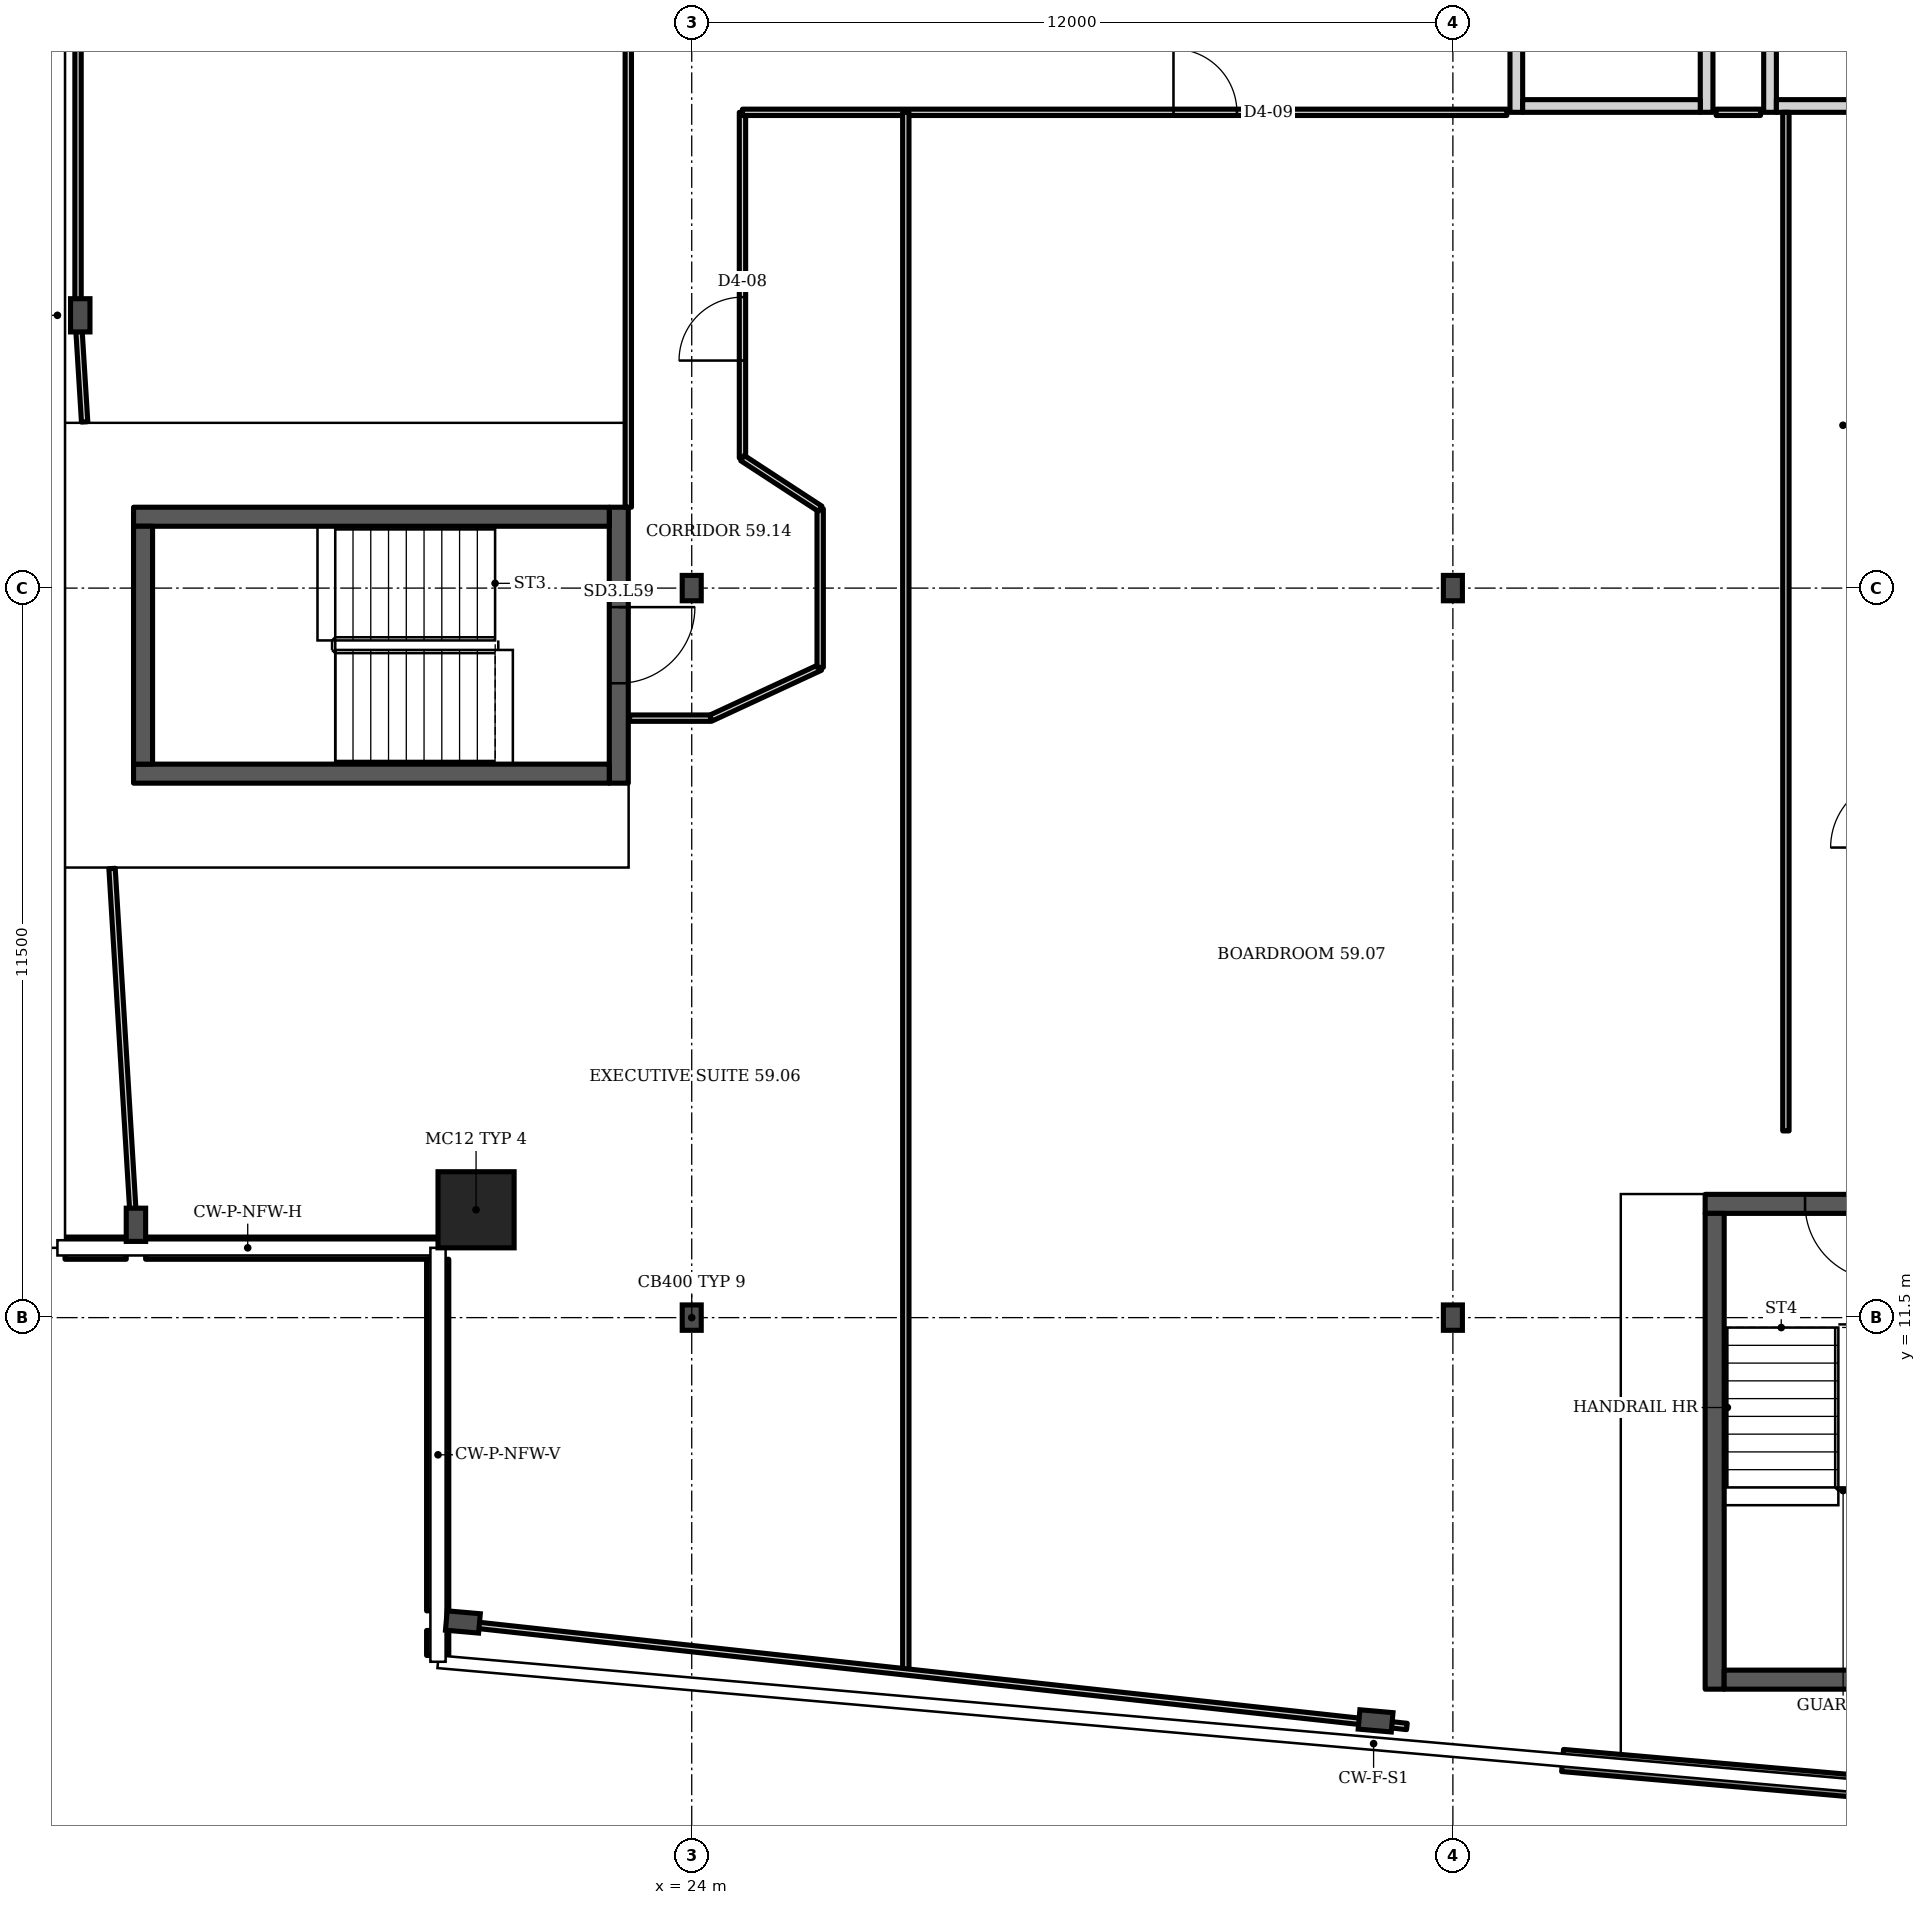
"""IFC4 building model, lengths in metres.
Left out: names, types, materials, properties, quantities, classifications, styles, units other than length and angle.
Written with IfcOpenShell. Run it as: python <this file> out.ifc"""

import sys

from ifc_helpers import new_model, si_unit, direction, frame, frame_2d, origin, origin_2d, place, context, subcontext, project, spatial, rectangle, i_section, extrude, element, fill, save


model = new_model("IFC4")
c1 = context("Model", 3, precision=1e-05, world=origin(), true_north=direction((0.0, 1.0)))
c2 = subcontext(c1, "Body", "Model", "MODEL_VIEW")
j1 = project(units=[si_unit("LENGTHUNIT", "METRE"), si_unit("PLANEANGLEUNIT", "RADIAN")], contexts=[c1])
p1 = place(None, origin())
s1 = spatial("IfcSite", under=j1, at=p1, CompositionType="ELEMENT")
p2 = place(p1, origin())
s2 = spatial("IfcBuilding", under=s1, at=p2, CompositionType="ELEMENT")
p3 = place(p2, frame((0.0, 0.0, 235.9)))
s3 = spatial("IfcBuildingStorey", under=s2, at=p3, CompositionType="ELEMENT", Elevation=235.9)
p4 = place(p3, frame((20.6, 13.2, 0.0), z_axis=(0.0, 0.0, 1.0), x_axis=(1.0, 0.0, 0.0)))
e1 = element("IfcColumn", 1, at=p4, inside=s3, PredefinedType="COLUMN", context=c2, shape_type="SweptSolid", body=[
    extrude(rectangle(XDim=1.2, YDim=1.2, at=origin_2d()), origin(), (0.0, 0.0, 1.0), 3.6),
])
for number, where, z_axis, x_axis in (
    (2, (20.392, 6.703, 0.0), (0.0, 0.0, 1.0), (-0.087, -0.996, 0.0)),
    (3, (34.781, 5.143, 0.0), (0.0, 0.0, 1.0), (-0.087, -0.996, 0.0)),
    (4, (14.36, 27.3, 0.0), (0.0, 0.0, 1.0), (-1.0, 0.0, 0.0)),
    (5, (15.238, 12.963, 0.0), (0.0, 0.0, 1.0), (-1.0, 0.0, 0.0)),
):
    element("IfcColumn", number, at=place(p3, frame(where, z_axis=z_axis, x_axis=x_axis)), inside=s3, PredefinedType="COLUMN", context=c2, shape_type="SweptSolid", body=[
        extrude(i_section(OverallWidth=0.306, OverallDepth=0.524, WebThickness=0.021, FlangeThickness=0.04, FilletRadius=0.027, at=origin_2d()), origin(), (0.0, 0.0, 1.0), 3.6),
    ])
for number, where, z_axis, x_axis in (
    (6, (24.0, 11.5, 0.0), (0.0, 0.0, 1.0), (1.0, 0.0, 0.0)),
    (7, (36.0, 11.5, 0.0), (0.0, 0.0, 1.0), (1.0, 0.0, 0.0)),
    (8, (24.0, 23.0, 0.0), (0.0, 0.0, 1.0), (1.0, 0.0, 0.0)),
    (9, (36.0, 23.0, 0.0), (0.0, 0.0, 1.0), (1.0, 0.0, 0.0)),
):
    element("IfcColumn", number, at=place(p3, frame(where, z_axis=z_axis, x_axis=x_axis)), inside=s3, PredefinedType="COLUMN", context=c2, shape_type="SweptSolid", body=[
        extrude(i_section(OverallWidth=0.3, OverallDepth=0.4, WebThickness=0.013, FlangeThickness=0.024, FilletRadius=0.027, at=origin_2d()), origin(), (0.0, 0.0, 1.0), 3.6),
    ])
p5 = place(p3, frame((37.729, 4.519, 0.0), z_axis=(0.0, 0.0, 1.0), x_axis=(0.99619, -0.087167, 0.0)))
e10 = element("IfcWall", 10, at=p5, inside=s3, PredefinedType="SOLIDWALL", context=c2, shape_type="SweptSolid", body=[
    extrude(rectangle(XDim=11.831, YDim=0.35, at=frame_2d((5.915, 0.0))), origin(), (0.0, 0.0, 1.0), 1.0),
])
p6 = place(p3, frame((14.12, 12.595, 0.0), z_axis=(0.0, 0.0, 1.0), x_axis=(1.0, 0.0, 0.0)))
e11 = element("IfcWall", 11, at=p6, inside=s3, PredefinedType="SOLIDWALL", context=c2, shape_type="SweptSolid", body=[
    extrude(rectangle(XDim=0.965, YDim=0.35, at=frame_2d((0.482, 0.0))), origin(), (0.0, 0.0, 1.0), 1.0),
])
p7 = place(p3, frame((15.391, 12.595, 0.0), z_axis=(0.0, 0.0, 1.0), x_axis=(1.0, 0.0, 0.0)))
e12 = element("IfcWall", 12, at=p7, inside=s3, PredefinedType="SOLIDWALL", context=c2, shape_type="SweptSolid", body=[
    extrude(rectangle(XDim=4.609, YDim=0.35, at=frame_2d((2.305, 0.0))), origin(), (0.0, 0.0, 1.0), 1.0),
])
p8 = place(p3, frame((19.995, 12.42, 0.0), z_axis=(0.0, 0.0, 1.0), x_axis=(0.0, -1.0, 0.0)))
e13 = element("IfcWall", 13, at=p8, inside=s3, PredefinedType="SOLIDWALL", context=c2, shape_type="SweptSolid", body=[
    extrude(rectangle(XDim=5.542, YDim=0.35, at=frame_2d((2.771, 0.0))), origin(), (0.0, 0.0, 1.0), 1.0),
])
p9 = place(p3, frame((19.995, 6.568, 0.0), z_axis=(0.0, 0.0, 1.0), x_axis=(0.0, -1.0, 0.0)))
e14 = element("IfcWall", 14, at=p9, inside=s3, PredefinedType="SOLIDWALL", context=c2, shape_type="SweptSolid", body=[
    extrude(rectangle(XDim=0.394, YDim=0.35, at=frame_2d((0.197, 0.0))), origin(), (0.0, 0.0, 1.0), 1.0),
])
p10 = place(p3, frame((37.0, 30.5, 0.0), z_axis=(0.0, 0.0, 1.0), x_axis=(0.0, 1.0, 0.0)))
e15 = element("IfcWall", 15, at=p10, inside=s3, PredefinedType="PARTITIONING", context=c2, shape_type="SweptSolid", body=[
    extrude(rectangle(XDim=3.5, YDim=0.2, at=frame_2d((1.75, 0.0))), origin(), (0.0, 0.0, 1.0), 3.2),
])
p11 = place(p10, frame((1.2, 0.0, 0.0)))
e16 = element("IfcOpeningElement", 16, at=p11, cuts=e15, PredefinedType="OPENING", context=c2, shape_type="SweptSolid", body=[
    extrude(rectangle(XDim=1.1, YDim=2.1, at=frame_2d((0.55, 1.05))), frame((0.0, 0.11, 0.0), z_axis=(0.0, -1.0, 0.0), x_axis=(1.0, 0.0, 0.0)), (0.0, 0.0, 1.0), 0.22),
])
p12 = place(p3, frame((40.0, 30.5, 0.0), z_axis=(0.0, 0.0, 1.0), x_axis=(0.0, 1.0, 0.0)))
e17 = element("IfcWall", 17, at=p12, inside=s3, PredefinedType="PARTITIONING", context=c2, shape_type="SweptSolid", body=[
    extrude(rectangle(XDim=3.5, YDim=0.2, at=frame_2d((1.75, 0.0))), origin(), (0.0, 0.0, 1.0), 3.2),
])
p13 = place(p3, frame((37.1, 30.6, 0.0), z_axis=(0.0, 0.0, 1.0), x_axis=(1.0, 0.0, 0.0)))
e18 = element("IfcWall", 18, at=p13, inside=s3, PredefinedType="PARTITIONING", context=c2, shape_type="SweptSolid", body=[
    extrude(rectangle(XDim=2.8, YDim=0.2, at=frame_2d((1.4, 0.0))), origin(), (0.0, 0.0, 1.0), 3.2),
])
p14 = place(p3, frame((41.0, 30.5, 0.0), z_axis=(0.0, 0.0, 1.0), x_axis=(0.0, 1.0, 0.0)))
e19 = element("IfcWall", 19, at=p14, inside=s3, PredefinedType="PARTITIONING", context=c2, shape_type="SweptSolid", body=[
    extrude(rectangle(XDim=3.5, YDim=0.2, at=frame_2d((1.75, 0.0))), origin(), (0.0, 0.0, 1.0), 3.2),
])
p15 = place(p3, frame((41.1, 30.6, 0.0), z_axis=(0.0, 0.0, 1.0), x_axis=(1.0, 0.0, 0.0)))
e20 = element("IfcWall", 20, at=p15, inside=s3, PredefinedType="PARTITIONING", context=c2, shape_type="SweptSolid", body=[
    extrude(rectangle(XDim=2.8, YDim=0.2, at=frame_2d((1.4, 0.0))), origin(), (0.0, 0.0, 1.0), 3.2),
])
p16 = place(p3, frame((22.85, 19.925, 0.0), z_axis=(0.0, 0.0, 1.0), x_axis=(0.0, 1.0, 0.0)))
e21 = element("IfcWall", 21, at=p16, inside=s3, PredefinedType="SHEAR", context=c2, shape_type="SweptSolid", body=[
    extrude(rectangle(XDim=4.35, YDim=0.3, at=frame_2d((2.175, 0.0))), origin(), (0.0, 0.0, 1.0), 3.2),
])
p17 = place(p16, frame((1.575, 0.0, 0.0)))
e22 = element("IfcOpeningElement", 22, at=p17, cuts=e21, PredefinedType="OPENING", context=c2, shape_type="SweptSolid", body=[
    extrude(rectangle(XDim=1.2, YDim=2.1, at=frame_2d((0.6, 1.05))), frame((0.0, 0.16, 0.0), z_axis=(0.0, -1.0, 0.0), x_axis=(1.0, 0.0, 0.0)), (0.0, 0.0, 1.0), 0.32),
])
p18 = place(p3, frame((39.977, 13.293, 0.0), z_axis=(0.0, 0.0, 1.0), x_axis=(1.0, 0.0, 0.0)))
e23 = element("IfcWall", 23, at=p18, inside=s3, PredefinedType="SHEAR", context=c2, shape_type="SweptSolid", body=[
    extrude(rectangle(XDim=4.35, YDim=0.3, at=frame_2d((2.175, 0.0))), origin(), (0.0, 0.0, 1.0), 3.2),
])
p19 = place(p18, frame((1.575, 0.0, 0.0)))
e24 = element("IfcOpeningElement", 24, at=p19, cuts=e23, PredefinedType="OPENING", context=c2, shape_type="SweptSolid", body=[
    extrude(rectangle(XDim=1.2, YDim=2.1, at=frame_2d((0.6, 1.05))), frame((0.0, 0.16, 0.0), z_axis=(0.0, -1.0, 0.0), x_axis=(1.0, 0.0, 0.0)), (0.0, 0.0, 1.0), 0.32),
])
p20 = place(p3, frame((14.325, 27.3, 0.0), z_axis=(0.0, 0.0, 1.0), x_axis=(0.0, 1.0, 0.0)))
e25 = element("IfcWall", 25, at=p20, inside=s3, PredefinedType="PARTITIONING", context=c2, shape_type="SweptSolid", body=[
    extrude(rectangle(XDim=14.68, YDim=0.1, at=frame_2d((7.34, 0.0))), origin(), (0.0, 0.0, 1.0), 2.58),
])
p21 = place(p3, frame((14.429, 25.62, 0.0), z_axis=(0.0, 0.0, 1.0), x_axis=(-0.061647, 0.998101, 0.0)))
e26 = element("IfcWall", 26, at=p21, inside=s3, PredefinedType="PARTITIONING", context=c2, shape_type="SweptSolid", body=[
    extrude(rectangle(XDim=1.683, YDim=0.1, at=frame_2d((0.842, 0.0))), origin(), (0.0, 0.0, 1.0), 2.58),
])
p22 = place(p3, frame((15.224, 12.62, 0.0), z_axis=(0.0, 0.0, 1.0), x_axis=(-0.060759, 0.998149, 0.0)))
e27 = element("IfcWall", 27, at=p22, inside=s3, PredefinedType="PARTITIONING", context=c2, shape_type="SweptSolid", body=[
    extrude(rectangle(XDim=5.971, YDim=0.1, at=frame_2d((2.985, 0.0))), origin(), (0.0, 0.0, 1.0), 2.58),
])
p23 = place(p3, frame((23.0, 24.275, 0.0), z_axis=(0.0, 0.0, 1.0), x_axis=(0.0, 1.0, 0.0)))
e28 = element("IfcWall", 28, at=p23, inside=s3, PredefinedType="PARTITIONING", context=c2, shape_type="SweptSolid", body=[
    extrude(rectangle(XDim=9.705, YDim=0.1, at=frame_2d((4.853, 0.0))), origin(), (0.0, 0.0, 1.0), 3.2),
])
p24 = place(p23, frame((7.905, 0.0, 0.0)))
e29 = element("IfcOpeningElement", 29, at=p24, cuts=e28, PredefinedType="OPENING", context=c2, shape_type="SweptSolid", body=[
    extrude(rectangle(XDim=1.0, YDim=2.1, at=frame_2d((0.5, 1.05))), frame((0.0, 0.06, 0.0), z_axis=(0.0, -1.0, 0.0), x_axis=(1.0, 0.0, 0.0)), (0.0, 0.0, 1.0), 0.12),
])
p25 = place(p3, frame((23.02, 20.95, 0.0), z_axis=(0.0, 0.0, 1.0), x_axis=(1.0, 0.0, 0.0)))
e30 = element("IfcWall", 30, at=p25, inside=s3, PredefinedType="PARTITIONING", context=c2, shape_type="SweptSolid", body=[
    extrude(rectangle(XDim=1.28, YDim=0.1, at=frame_2d((0.64, 0.0))), origin(), (0.0, 0.0, 1.0), 3.2),
])
p26 = place(p3, frame((24.3, 20.95, 0.0), z_axis=(0.0, 0.0, 1.0), x_axis=(0.907168, 0.420777, 0.0)))
e31 = element("IfcWall", 31, at=p26, inside=s3, PredefinedType="PARTITIONING", context=c2, shape_type="SweptSolid", body=[
    extrude(rectangle(XDim=1.901, YDim=0.1, at=frame_2d((0.951, 0.0))), origin(), (0.0, 0.0, 1.0), 3.2),
])
p27 = place(p3, frame((24.8, 25.05, 0.0), z_axis=(0.0, 0.0, 1.0), x_axis=(0.0, 1.0, 0.0)))
e32 = element("IfcWall", 32, at=p27, inside=s3, PredefinedType="PARTITIONING", context=c2, shape_type="SweptSolid", body=[
    extrude(rectangle(XDim=5.45, YDim=0.1, at=frame_2d((2.725, 0.0))), origin(), (0.0, 0.0, 1.0), 3.2),
])
p28 = place(p27, frame((1.537, 0.0, 0.0)))
e33 = element("IfcOpeningElement", 33, at=p28, cuts=e32, PredefinedType="OPENING", context=c2, shape_type="SweptSolid", body=[
    extrude(rectangle(XDim=1.0, YDim=2.1, at=frame_2d((0.5, 1.05))), frame((0.0, 0.06, 0.0), z_axis=(0.0, -1.0, 0.0), x_axis=(1.0, 0.0, 0.0)), (0.0, 0.0, 1.0), 0.12),
])
p29 = place(p3, frame((24.8, 30.5, 0.0), z_axis=(0.0, 0.0, 1.0), x_axis=(1.0, 0.0, 0.0)))
e34 = element("IfcWall", 34, at=p29, inside=s3, PredefinedType="PARTITIONING", context=c2, shape_type="SweptSolid", body=[
    extrude(rectangle(XDim=12.05, YDim=0.1, at=frame_2d((6.025, 0.0))), origin(), (0.0, 0.0, 1.0), 3.2),
])
p30 = place(p29, frame((6.795, 0.0, 0.0)))
e35 = element("IfcOpeningElement", 35, at=p30, cuts=e34, PredefinedType="OPENING", context=c2, shape_type="SweptSolid", body=[
    extrude(rectangle(XDim=1.0, YDim=2.1, at=frame_2d((0.5, 1.05))), frame((0.0, 0.06, 0.0), z_axis=(0.0, -1.0, 0.0), x_axis=(1.0, 0.0, 0.0)), (0.0, 0.0, 1.0), 0.12),
])
p31 = place(p3, frame((26.025, 21.75, 0.0), z_axis=(0.0, 0.0, 1.0), x_axis=(0.0, 1.0, 0.0)))
e36 = element("IfcWall", 36, at=p31, inside=s3, PredefinedType="PARTITIONING", context=c2, shape_type="SweptSolid", body=[
    extrude(rectangle(XDim=2.5, YDim=0.1, at=frame_2d((1.25, 0.0))), origin(), (0.0, 0.0, 1.0), 3.2),
])
p32 = place(p3, frame((26.025, 24.25, 0.0), z_axis=(0.0, 0.0, 1.0), x_axis=(-0.837222, 0.546856, 0.0)))
e37 = element("IfcWall", 37, at=p32, inside=s3, PredefinedType="PARTITIONING", context=c2, shape_type="SweptSolid", body=[
    extrude(rectangle(XDim=1.463, YDim=0.1, at=frame_2d((0.731, 0.0))), origin(), (0.0, 0.0, 1.0), 3.2),
])
p33 = place(p3, frame((27.375, 5.915, 0.0), z_axis=(0.0, 0.0, 1.0), x_axis=(0.0, 1.0, 0.0)))
e38 = element("IfcWall", 38, at=p33, inside=s3, PredefinedType="PARTITIONING", context=c2, shape_type="SweptSolid", body=[
    extrude(rectangle(XDim=24.585, YDim=0.1, at=frame_2d((12.292, 0.0))), origin(), (0.0, 0.0, 1.0), 3.2),
])
p34 = place(p3, frame((35.275, 5.055, 0.0), z_axis=(0.0, 0.0, 1.0), x_axis=(-0.994128, 0.108228, 0.0)))
e39 = element("IfcWall", 39, at=p34, inside=s3, PredefinedType="PARTITIONING", context=c2, shape_type="SweptSolid", body=[
    extrude(rectangle(XDim=15.335, YDim=0.1, at=frame_2d((7.667, 0.0))), origin(), (0.0, 0.0, 1.0), 2.58),
])
p35 = place(p3, frame((41.25, 14.443, 0.0), z_axis=(0.0, 0.0, 1.0), x_axis=(0.0, 1.0, 0.0)))
e40 = element("IfcWall", 40, at=p35, inside=s3, PredefinedType="PARTITIONING", context=c2, shape_type="SweptSolid", body=[
    extrude(rectangle(XDim=16.057, YDim=0.1, at=frame_2d((8.028, 0.0))), origin(), (0.0, 0.0, 1.0), 3.2),
])
p36 = place(p3, frame((40.15, 30.5, 0.0), z_axis=(0.0, 0.0, 1.0), x_axis=(1.0, 0.0, 0.0)))
e41 = element("IfcWall", 41, at=p36, inside=s3, PredefinedType="PARTITIONING", context=c2, shape_type="SweptSolid", body=[
    extrude(rectangle(XDim=0.7, YDim=0.1, at=frame_2d((0.35, 0.0))), origin(), (0.0, 0.0, 1.0), 3.2),
])
for number, where, z_axis, x_axis in (
    (42, (15.2, 20.075, 0.0), (0.0, 0.0, 1.0), (1.0, 0.0, 0.0)),
    (43, (15.2, 24.125, 0.0), (0.0, 0.0, 1.0), (1.0, 0.0, 0.0)),
):
    element("IfcWall", number, at=place(p3, frame(where, z_axis=z_axis, x_axis=x_axis)), inside=s3, PredefinedType="SHEAR", context=c2, shape_type="SweptSolid", body=[
        extrude(rectangle(XDim=7.5, YDim=0.3, at=frame_2d((3.75, 0.0))), origin(), (0.0, 0.0, 1.0), 3.2),
    ])
p37 = place(p3, frame((15.35, 20.225, 0.0), z_axis=(0.0, 0.0, 1.0), x_axis=(0.0, 1.0, 0.0)))
e44 = element("IfcWall", 44, at=p37, inside=s3, PredefinedType="SHEAR", context=c2, shape_type="SweptSolid", body=[
    extrude(rectangle(XDim=3.75, YDim=0.3, at=frame_2d((1.875, 0.0))), origin(), (0.0, 0.0, 1.0), 3.2),
])
p38 = place(p3, frame((40.127, 5.643, 0.0), z_axis=(0.0, 0.0, 1.0), x_axis=(0.0, 1.0, 0.0)))
e45 = element("IfcWall", 45, at=p38, inside=s3, PredefinedType="SHEAR", context=c2, shape_type="SweptSolid", body=[
    extrude(rectangle(XDim=7.5, YDim=0.3, at=frame_2d((3.75, 0.0))), origin(), (0.0, 0.0, 1.0), 3.2),
])
p39 = place(p3, frame((40.277, 5.793, 0.0), z_axis=(0.0, 0.0, 1.0), x_axis=(1.0, 0.0, 0.0)))
e46 = element("IfcWall", 46, at=p39, inside=s3, PredefinedType="SHEAR", context=c2, shape_type="SweptSolid", body=[
    extrude(rectangle(XDim=3.75, YDim=0.3, at=frame_2d((1.875, 0.0))), origin(), (0.0, 0.0, 1.0), 3.2),
])
p40 = place(p17, origin())
e47 = element("IfcDoor", 47, at=p40, inside=s3, OperationType="SINGLE_SWING_RIGHT", PredefinedType="DOOR", context=c2, shape_type="SweptSolid", body=[
    extrude(rectangle(XDim=1.2, YDim=2.1, at=frame_2d((0.6, 1.05))), frame((0.0, 0.025, 0.0), z_axis=(0.0, -1.0, 0.0), x_axis=(1.0, 0.0, 0.0)), (0.0, 0.0, 1.0), 0.05),
])
fill(e22, e47)
p41 = place(p19, origin())
e48 = element("IfcDoor", 48, at=p41, inside=s3, OperationType="SINGLE_SWING_RIGHT", PredefinedType="DOOR", context=c2, shape_type="SweptSolid", body=[
    extrude(rectangle(XDim=1.2, YDim=2.1, at=frame_2d((0.6, 1.05))), frame((0.0, 0.025, 0.0), z_axis=(0.0, -1.0, 0.0), x_axis=(1.0, 0.0, 0.0)), (0.0, 0.0, 1.0), 0.05),
])
fill(e24, e48)
p42 = place(p28, origin())
e49 = element("IfcDoor", 49, at=p42, inside=s3, OperationType="SINGLE_SWING_LEFT", PredefinedType="DOOR", context=c2, shape_type="SweptSolid", body=[
    extrude(rectangle(XDim=1.0, YDim=2.1, at=frame_2d((0.5, 1.05))), frame((0.0, 0.025, 0.0), z_axis=(0.0, -1.0, 0.0), x_axis=(1.0, 0.0, 0.0)), (0.0, 0.0, 1.0), 0.05),
])
fill(e33, e49)
p43 = place(p30, origin())
e50 = element("IfcDoor", 50, at=p43, inside=s3, OperationType="SINGLE_SWING_LEFT", PredefinedType="DOOR", context=c2, shape_type="SweptSolid", body=[
    extrude(rectangle(XDim=1.0, YDim=2.1, at=frame_2d((0.5, 1.05))), frame((0.0, 0.025, 0.0), z_axis=(0.0, -1.0, 0.0), x_axis=(1.0, 0.0, 0.0)), (0.0, 0.0, 1.0), 0.05),
])
fill(e35, e50)
save(model, sys.argv[1])
